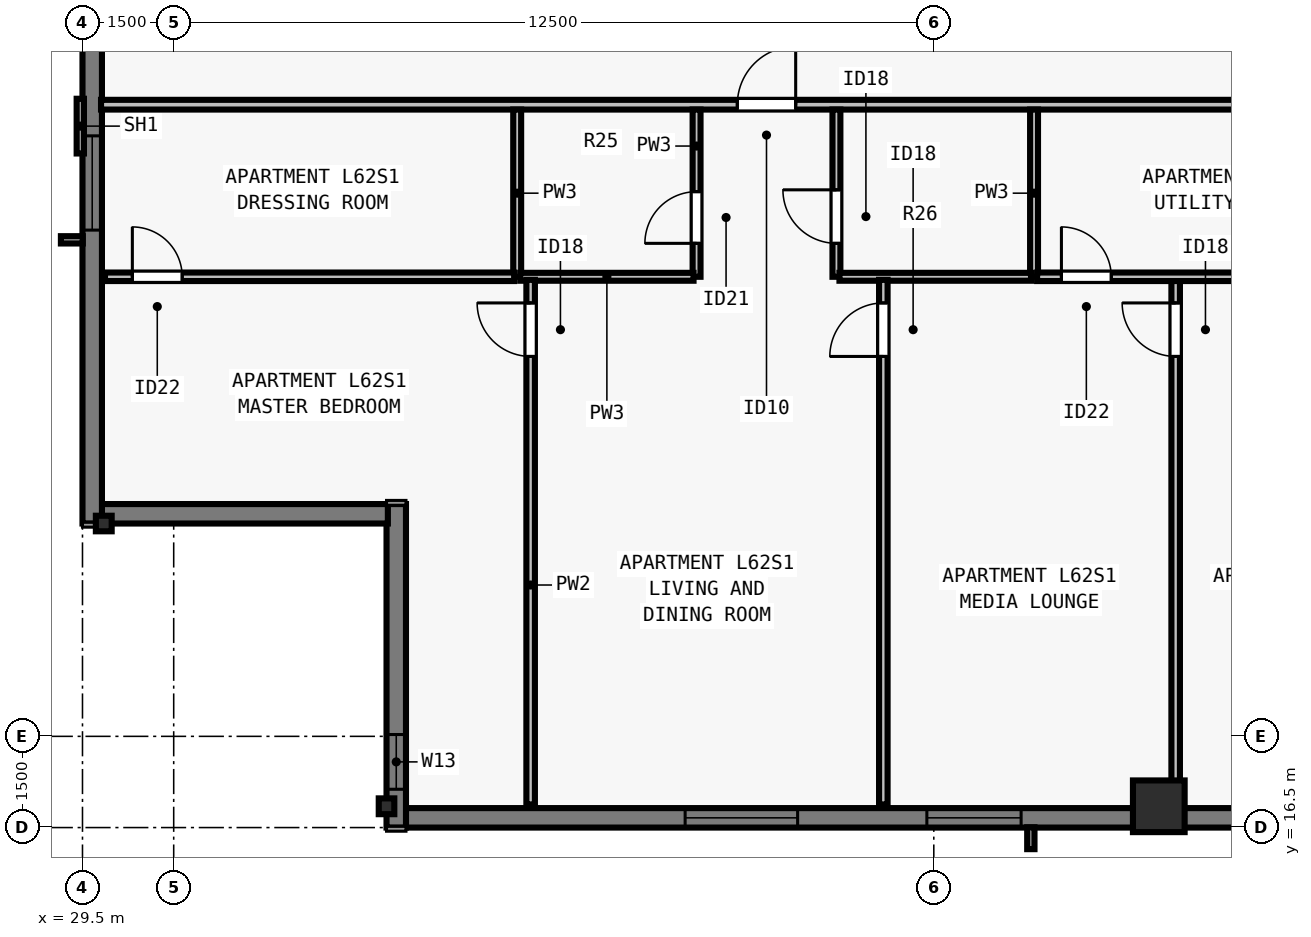
"""IFC4 building model, lengths in metres.
Left out: names, types, materials, properties, quantities, classifications, styles, units other than length and angle.
Written with IfcOpenShell. Run it as: python <this file> out.ifc"""

import sys

from ifc_helpers import new_model, si_unit, direction, frame, frame_2d, origin, origin_2d, place, context, subcontext, project, spatial, rectangle, i_section, extrude, element, fill, save


model = new_model("IFC4")
c1 = context("Model", 3, precision=1e-05, world=origin(), true_north=direction((0.0, 1.0)))
c2 = subcontext(c1, "Body", "Model", "MODEL_VIEW")
j1 = project(units=[si_unit("LENGTHUNIT", "METRE"), si_unit("PLANEANGLEUNIT", "RADIAN")], contexts=[c1])
p1 = place(None, origin())
s1 = spatial("IfcSite", under=j1, at=p1, CompositionType="ELEMENT")
p2 = place(p1, origin())
s2 = spatial("IfcBuilding", under=s1, at=p2, CompositionType="ELEMENT")
p3 = place(p2, frame((0.0, 0.0, 227.0)))
s3 = spatial("IfcBuildingStorey", under=s2, at=p3, CompositionType="ELEMENT", Elevation=227.0)
p4 = place(p3, frame((34.5, 16.85, 0.0), z_axis=(0.0, 0.0, 1.0), x_axis=(1.0, 0.0, 0.0)))
e1 = element("IfcColumn", 1, at=p4, inside=s3, PredefinedType="COLUMN", context=c2, shape_type="SweptSolid", body=[
    extrude(i_section(OverallWidth=0.256, OverallDepth=0.26, WebThickness=0.01, FlangeThickness=0.017, FilletRadius=0.013, at=origin_2d()), origin(), (0.0, 0.0, 1.0), 3.5),
])
p5 = place(p3, frame((47.2, 16.85, 0.0), z_axis=(0.0, 0.0, 1.0), x_axis=(1.0, 0.0, 0.0)))
e2 = element("IfcColumn", 2, at=p5, inside=s3, PredefinedType="COLUMN", context=c2, shape_type="SweptSolid", body=[
    extrude(rectangle(XDim=0.85, YDim=0.85, at=origin_2d()), origin(), (0.0, 0.0, 1.0), 3.5),
])
p6 = place(p3, frame((29.85, 21.5, 0.0), z_axis=(0.0, 0.0, 1.0), x_axis=(0.0, 1.0, 0.0)))
e3 = element("IfcColumn", 3, at=p6, inside=s3, PredefinedType="COLUMN", context=c2, shape_type="SweptSolid", body=[
    extrude(i_section(OverallWidth=0.256, OverallDepth=0.26, WebThickness=0.01, FlangeThickness=0.017, FilletRadius=0.013, at=origin_2d()), origin(), (0.0, 0.0, 1.0), 3.5),
])
p7 = place(p3, frame((69.5, 16.66, 0.0), z_axis=(0.0, 0.0, 1.0), x_axis=(-1.0, 0.0, 0.0)))
e4 = element("IfcWall", 4, at=p7, inside=s3, PredefinedType="SOLIDWALL", context=c2, shape_type="SweptSolid", body=[
    extrude(rectangle(XDim=34.702, YDim=0.32, at=frame_2d((17.351, 0.0))), origin(), (0.0, 0.0, 1.0), 3.29),
])
p8 = place(p7, frame((5.613, 0.0, 0.8)))
e5 = element("IfcOpeningElement", 5, at=p8, cuts=e4, PredefinedType="OPENING", context=c2, shape_type="SweptSolid", body=[
    extrude(rectangle(XDim=1.55, YDim=1.678, at=frame_2d((0.775, 0.839))), frame((0.0, 0.17, 0.0), z_axis=(0.0, -1.0, 0.0), x_axis=(1.0, 0.0, 0.0)), (0.0, 0.0, 1.0), 0.34),
])
p9 = place(p7, frame((7.988, 0.0, 0.8)))
e6 = element("IfcOpeningElement", 6, at=p9, cuts=e4, PredefinedType="OPENING", context=c2, shape_type="SweptSolid", body=[
    extrude(rectangle(XDim=1.85, YDim=1.678, at=frame_2d((0.925, 0.839))), frame((0.0, 0.17, 0.0), z_axis=(0.0, -1.0, 0.0), x_axis=(1.0, 0.0, 0.0)), (0.0, 0.0, 1.0), 0.34),
])
p10 = place(p7, frame((10.263, 0.0, 0.8)))
e7 = element("IfcOpeningElement", 7, at=p10, cuts=e4, PredefinedType="OPENING", context=c2, shape_type="SweptSolid", body=[
    extrude(rectangle(XDim=1.55, YDim=1.678, at=frame_2d((0.775, 0.839))), frame((0.0, 0.17, 0.0), z_axis=(0.0, -1.0, 0.0), x_axis=(1.0, 0.0, 0.0)), (0.0, 0.0, 1.0), 0.34),
])
p11 = place(p7, frame((14.738, 0.0, 0.8)))
e8 = element("IfcOpeningElement", 8, at=p11, cuts=e4, PredefinedType="OPENING", context=c2, shape_type="SweptSolid", body=[
    extrude(rectangle(XDim=1.85, YDim=1.678, at=frame_2d((0.925, 0.839))), frame((0.0, 0.17, 0.0), z_axis=(0.0, -1.0, 0.0), x_axis=(1.0, 0.0, 0.0)), (0.0, 0.0, 1.0), 0.34),
])
p12 = place(p7, frame((18.264, 0.0, 0.8)))
e9 = element("IfcOpeningElement", 9, at=p12, cuts=e4, PredefinedType="OPENING", context=c2, shape_type="SweptSolid", body=[
    extrude(rectangle(XDim=1.55, YDim=1.678, at=frame_2d((0.775, 0.839))), frame((0.0, 0.17, 0.0), z_axis=(0.0, -1.0, 0.0), x_axis=(1.0, 0.0, 0.0)), (0.0, 0.0, 1.0), 0.34),
])
p13 = place(p7, frame((24.564, 0.0, 0.8)))
e10 = element("IfcOpeningElement", 10, at=p13, cuts=e4, PredefinedType="OPENING", context=c2, shape_type="SweptSolid", body=[
    extrude(rectangle(XDim=1.55, YDim=1.678, at=frame_2d((0.775, 0.839))), frame((0.0, 0.17, 0.0), z_axis=(0.0, -1.0, 0.0), x_axis=(1.0, 0.0, 0.0)), (0.0, 0.0, 1.0), 0.34),
])
p14 = place(p7, frame((28.24, 0.0, 0.8)))
e11 = element("IfcOpeningElement", 11, at=p14, cuts=e4, PredefinedType="OPENING", context=c2, shape_type="SweptSolid", body=[
    extrude(rectangle(XDim=1.85, YDim=1.678, at=frame_2d((0.925, 0.839))), frame((0.0, 0.17, 0.0), z_axis=(0.0, -1.0, 0.0), x_axis=(1.0, 0.0, 0.0)), (0.0, 0.0, 1.0), 0.34),
])
p15 = place(p3, frame((34.66, 16.5, 0.0), z_axis=(0.0, 0.0, 1.0), x_axis=(0.0, 1.0, 0.0)))
e12 = element("IfcWall", 12, at=p15, inside=s3, PredefinedType="SOLIDWALL", context=c2, shape_type="SweptSolid", body=[
    extrude(rectangle(XDim=5.32, YDim=0.32, at=frame_2d((2.66, 0.0))), origin(), (0.0, 0.0, 1.0), 3.29),
])
p16 = place(p15, frame((0.63, 0.0, 0.8)))
e13 = element("IfcOpeningElement", 13, at=p16, cuts=e12, PredefinedType="OPENING", context=c2, shape_type="SweptSolid", body=[
    extrude(rectangle(XDim=0.9, YDim=1.678, at=frame_2d((0.45, 0.839))), frame((0.0, 0.17, 0.0), z_axis=(0.0, -1.0, 0.0), x_axis=(1.0, 0.0, 0.0)), (0.0, 0.0, 1.0), 0.34),
])
p17 = place(p3, frame((34.522, 21.66, 0.0), z_axis=(0.0, 0.0, 1.0), x_axis=(-1.0, 0.0, 0.0)))
e14 = element("IfcWall", 14, at=p17, inside=s3, PredefinedType="SOLIDWALL", context=c2, shape_type="SweptSolid", body=[
    extrude(rectangle(XDim=4.724, YDim=0.32, at=frame_2d((2.362, 0.0))), origin(), (0.0, 0.0, 1.0), 3.29),
])
p18 = place(p3, frame((29.66, 21.5, 0.0), z_axis=(0.0, 0.0, 1.0), x_axis=(0.0, 1.0, 0.0)))
e15 = element("IfcWall", 15, at=p18, inside=s3, PredefinedType="SOLIDWALL", context=c2, shape_type="SweptSolid", body=[
    extrude(rectangle(XDim=22.602, YDim=0.32, at=frame_2d((11.301, 0.0))), origin(), (0.0, 0.0, 1.0), 3.29),
])
p19 = place(p18, frame((4.825, 0.0, 0.8)))
e16 = element("IfcOpeningElement", 16, at=p19, cuts=e15, PredefinedType="OPENING", context=c2, shape_type="SweptSolid", body=[
    extrude(rectangle(XDim=1.55, YDim=1.678, at=frame_2d((0.775, 0.839))), frame((0.0, 0.17, 0.0), z_axis=(0.0, -1.0, 0.0), x_axis=(1.0, 0.0, 0.0)), (0.0, 0.0, 1.0), 0.34),
])
p20 = place(p18, frame((9.426, 0.0, 0.8)))
e17 = element("IfcOpeningElement", 17, at=p20, cuts=e15, PredefinedType="OPENING", context=c2, shape_type="SweptSolid", body=[
    extrude(rectangle(XDim=1.85, YDim=1.678, at=frame_2d((0.925, 0.839))), frame((0.0, 0.17, 0.0), z_axis=(0.0, -1.0, 0.0), x_axis=(1.0, 0.0, 0.0)), (0.0, 0.0, 1.0), 0.34),
])
p21 = place(p18, frame((15.177, 0.0, 0.8)))
e18 = element("IfcOpeningElement", 18, at=p21, cuts=e15, PredefinedType="OPENING", context=c2, shape_type="SweptSolid", body=[
    extrude(rectangle(XDim=1.85, YDim=1.678, at=frame_2d((0.925, 0.839))), frame((0.0, 0.17, 0.0), z_axis=(0.0, -1.0, 0.0), x_axis=(1.0, 0.0, 0.0)), (0.0, 0.0, 1.0), 0.34),
])
p22 = place(p18, frame((19.677, 0.0, 0.8)))
e19 = element("IfcOpeningElement", 19, at=p22, cuts=e15, PredefinedType="OPENING", context=c2, shape_type="SweptSolid", body=[
    extrude(rectangle(XDim=1.55, YDim=1.678, at=frame_2d((0.775, 0.839))), frame((0.0, 0.17, 0.0), z_axis=(0.0, -1.0, 0.0), x_axis=(1.0, 0.0, 0.0)), (0.0, 0.0, 1.0), 0.34),
])
p23 = place(p3, frame((29.805, 28.387, 0.0), z_axis=(0.0, 0.0, 1.0), x_axis=(1.0, 0.0, 0.0)))
e20 = element("IfcWall", 20, at=p23, inside=s3, PredefinedType="PARTITIONING", context=c2, shape_type="SweptSolid", body=[
    extrude(rectangle(XDim=44.39, YDim=0.16, at=frame_2d((22.195, 0.0))), origin(), (0.0, 0.0, 1.0), 2.958),
])
p24 = place(p23, frame((10.464, 0.0, 0.0)))
e21 = element("IfcOpeningElement", 21, at=p24, cuts=e20, PredefinedType="OPENING", context=c2, shape_type="SweptSolid", body=[
    extrude(rectangle(XDim=0.96, YDim=2.18, at=frame_2d((0.48, 1.09))), frame((0.0, 0.09, 0.0), z_axis=(0.0, -1.0, 0.0), x_axis=(1.0, 0.0, 0.0)), (0.0, 0.0, 1.0), 0.18),
])
p25 = place(p23, frame((32.544, 0.0, 0.0)))
e22 = element("IfcOpeningElement", 22, at=p25, cuts=e20, PredefinedType="OPENING", context=c2, shape_type="SweptSolid", body=[
    extrude(rectangle(XDim=0.96, YDim=2.18, at=frame_2d((0.48, 1.09))), frame((0.0, 0.09, 0.0), z_axis=(0.0, -1.0, 0.0), x_axis=(1.0, 0.0, 0.0)), (0.0, 0.0, 1.0), 0.18),
])
p26 = place(p3, frame((36.649, 25.558, 0.0), z_axis=(0.0, 0.0, 1.0), x_axis=(0.0, 1.0, 0.0)))
e23 = element("IfcWall", 23, at=p26, inside=s3, PredefinedType="PLUMBINGWALL", context=c2, shape_type="SweptSolid", body=[
    extrude(rectangle(XDim=2.75, YDim=0.13, at=frame_2d((1.375, 0.0))), origin(), (0.0, 0.0, 1.0), 3.29),
])
p27 = place(p3, frame((39.599, 25.558, 0.0), z_axis=(0.0, 0.0, 1.0), x_axis=(0.0, 1.0, 0.0)))
e24 = element("IfcWall", 24, at=p27, inside=s3, PredefinedType="PLUMBINGWALL", context=c2, shape_type="SweptSolid", body=[
    extrude(rectangle(XDim=2.75, YDim=0.13, at=frame_2d((1.375, 0.0))), origin(), (0.0, 0.0, 1.0), 3.29),
])
p28 = place(p27, frame((0.55, 0.0, 0.0)))
e25 = element("IfcOpeningElement", 25, at=p28, cuts=e24, PredefinedType="OPENING", context=c2, shape_type="SweptSolid", body=[
    extrude(rectangle(XDim=0.85, YDim=2.08, at=frame_2d((0.425, 1.04))), frame((0.0, 0.075, 0.0), z_axis=(0.0, -1.0, 0.0), x_axis=(1.0, 0.0, 0.0)), (0.0, 0.0, 1.0), 0.15),
])
p29 = place(p3, frame((36.699, 25.558, 0.0), z_axis=(0.0, 0.0, 1.0), x_axis=(1.0, 0.0, 0.0)))
e26 = element("IfcWall", 26, at=p29, inside=s3, PredefinedType="PLUMBINGWALL", context=c2, shape_type="SweptSolid", body=[
    extrude(rectangle(XDim=2.85, YDim=0.13, at=frame_2d((1.425, 0.0))), origin(), (0.0, 0.0, 1.0), 3.29),
])
p30 = place(p3, frame((45.149, 25.558, 0.0), z_axis=(0.0, 0.0, 1.0), x_axis=(0.0, 1.0, 0.0)))
e27 = element("IfcWall", 27, at=p30, inside=s3, PredefinedType="PLUMBINGWALL", context=c2, shape_type="SweptSolid", body=[
    extrude(rectangle(XDim=2.75, YDim=0.13, at=frame_2d((1.375, 0.0))), origin(), (0.0, 0.0, 1.0), 3.29),
])
p31 = place(p3, frame((41.899, 25.558, 0.0), z_axis=(0.0, 0.0, 1.0), x_axis=(0.0, 1.0, 0.0)))
e28 = element("IfcWall", 28, at=p31, inside=s3, PredefinedType="PLUMBINGWALL", context=c2, shape_type="SweptSolid", body=[
    extrude(rectangle(XDim=2.75, YDim=0.13, at=frame_2d((1.375, 0.0))), origin(), (0.0, 0.0, 1.0), 2.573),
])
p32 = place(p31, frame((0.55, 0.0, 0.0)))
e29 = element("IfcOpeningElement", 29, at=p32, cuts=e28, PredefinedType="OPENING", context=c2, shape_type="SweptSolid", body=[
    extrude(rectangle(XDim=0.88, YDim=2.1, at=frame_2d((0.44, 1.05))), frame((0.0, 0.075, 0.0), z_axis=(0.0, -1.0, 0.0), x_axis=(1.0, 0.0, 0.0)), (0.0, 0.0, 1.0), 0.15),
])
p33 = place(p3, frame((41.949, 25.558, 0.0), z_axis=(0.0, 0.0, 1.0), x_axis=(1.0, 0.0, 0.0)))
e30 = element("IfcWall", 30, at=p33, inside=s3, PredefinedType="PLUMBINGWALL", context=c2, shape_type="SweptSolid", body=[
    extrude(rectangle(XDim=3.15, YDim=0.13, at=frame_2d((1.575, 0.0))), origin(), (0.0, 0.0, 1.0), 3.29),
])
p34 = place(p3, frame((36.87, 16.88, 0.0), z_axis=(0.0, 0.0, 1.0), x_axis=(0.0, 1.0, 0.0)))
e31 = element("IfcWall", 31, at=p34, inside=s3, PredefinedType="PARTITIONING", context=c2, shape_type="SweptSolid", body=[
    extrude(rectangle(XDim=8.628, YDim=0.14, at=frame_2d((4.314, 0.0))), origin(), (0.0, 0.0, 1.0), 2.573),
])
p35 = place(p34, frame((7.367, 0.0, 0.0)))
e32 = element("IfcOpeningElement", 32, at=p35, cuts=e31, PredefinedType="OPENING", context=c2, shape_type="SweptSolid", body=[
    extrude(rectangle(XDim=0.88, YDim=2.1, at=frame_2d((0.44, 1.05))), frame((0.0, 0.08, 0.0), z_axis=(0.0, -1.0, 0.0), x_axis=(1.0, 0.0, 0.0)), (0.0, 0.0, 1.0), 0.16),
])
p36 = place(p3, frame((29.87, 25.558, 0.0), z_axis=(0.0, 0.0, 1.0), x_axis=(1.0, 0.0, 0.0)))
e33 = element("IfcWall", 33, at=p36, inside=s3, PredefinedType="PARTITIONING", context=c2, shape_type="SweptSolid", body=[
    extrude(rectangle(XDim=6.729, YDim=0.14, at=frame_2d((3.364, 0.0))), origin(), (0.0, 0.0, 1.0), 2.958),
])
p37 = place(p36, frame((0.45, 0.0, 0.0)))
e34 = element("IfcOpeningElement", 34, at=p37, cuts=e33, PredefinedType="OPENING", context=c2, shape_type="SweptSolid", body=[
    extrude(rectangle(XDim=0.82, YDim=2.1, at=frame_2d((0.41, 1.05))), frame((0.0, 0.08, 0.0), z_axis=(0.0, -1.0, 0.0), x_axis=(1.0, 0.0, 0.0)), (0.0, 0.0, 1.0), 0.16),
])
p38 = place(p3, frame((47.478, 16.88, 0.0), z_axis=(0.0, 0.0, 1.0), x_axis=(0.0, 1.0, 0.0)))
e35 = element("IfcWall", 35, at=p38, inside=s3, PredefinedType="PARTITIONING", context=c2, shape_type="SweptSolid", body=[
    extrude(rectangle(XDim=8.718, YDim=0.14, at=frame_2d((4.359, 0.0))), origin(), (0.0, 0.0, 1.0), 2.958),
])
p39 = place(p38, frame((7.367, 0.0, 0.0)))
e36 = element("IfcOpeningElement", 36, at=p39, cuts=e35, PredefinedType="OPENING", context=c2, shape_type="SweptSolid", body=[
    extrude(rectangle(XDim=0.88, YDim=2.1, at=frame_2d((0.44, 1.05))), frame((0.0, 0.08, 0.0), z_axis=(0.0, -1.0, 0.0), x_axis=(1.0, 0.0, 0.0)), (0.0, 0.0, 1.0), 0.16),
])
p40 = place(p3, frame((45.199, 25.558, 0.0), z_axis=(0.0, 0.0, 1.0), x_axis=(1.0, 0.0, 0.0)))
e37 = element("IfcWall", 37, at=p40, inside=s3, PredefinedType="PARTITIONING", context=c2, shape_type="SweptSolid", body=[
    extrude(rectangle(XDim=6.429, YDim=0.14, at=frame_2d((3.214, 0.0))), origin(), (0.0, 0.0, 1.0), 3.29),
])
p41 = place(p40, frame((0.4, 0.0, 0.0)))
e38 = element("IfcOpeningElement", 38, at=p41, cuts=e37, PredefinedType="OPENING", context=c2, shape_type="SweptSolid", body=[
    extrude(rectangle(XDim=0.82, YDim=2.1, at=frame_2d((0.41, 1.05))), frame((0.0, 0.08, 0.0), z_axis=(0.0, -1.0, 0.0), x_axis=(1.0, 0.0, 0.0)), (0.0, 0.0, 1.0), 0.16),
])
p42 = place(p3, frame((42.67, 16.88, 0.0), z_axis=(0.0, 0.0, 1.0), x_axis=(0.0, 1.0, 0.0)))
e39 = element("IfcWall", 39, at=p42, inside=s3, PredefinedType="PARTITIONING", context=c2, shape_type="SweptSolid", body=[
    extrude(rectangle(XDim=8.628, YDim=0.14, at=frame_2d((4.314, 0.0))), origin(), (0.0, 0.0, 1.0), 3.29),
])
p43 = place(p42, frame((7.367, 0.0, 0.0)))
e40 = element("IfcOpeningElement", 40, at=p43, cuts=e39, PredefinedType="OPENING", context=c2, shape_type="SweptSolid", body=[
    extrude(rectangle(XDim=0.88, YDim=2.1, at=frame_2d((0.44, 1.05))), frame((0.0, 0.08, 0.0), z_axis=(0.0, -1.0, 0.0), x_axis=(1.0, 0.0, 0.0)), (0.0, 0.0, 1.0), 0.16),
])
p44 = place(p13, origin())
e41 = element("IfcWindow", 41, at=p44, inside=s3, PartitioningType="SINGLE_PANEL", PredefinedType="WINDOW", context=c2, shape_type="SweptSolid", body=[
    extrude(rectangle(XDim=1.55, YDim=1.678, at=frame_2d((0.775, 0.839))), frame((0.0, -0.05, 0.0), z_axis=(0.0, -1.0, 0.0), x_axis=(1.0, 0.0, 0.0)), (0.0, 0.0, 1.0), 0.06),
])
fill(e10, e41)
p45 = place(p14, origin())
e42 = element("IfcWindow", 42, at=p45, inside=s3, PartitioningType="SINGLE_PANEL", PredefinedType="WINDOW", context=c2, shape_type="SweptSolid", body=[
    extrude(rectangle(XDim=1.85, YDim=1.678, at=frame_2d((0.925, 0.839))), frame((0.0, -0.05, 0.0), z_axis=(0.0, -1.0, 0.0), x_axis=(1.0, 0.0, 0.0)), (0.0, 0.0, 1.0), 0.06),
])
fill(e11, e42)
p46 = place(p19, origin())
e43 = element("IfcWindow", 43, at=p46, inside=s3, PartitioningType="SINGLE_PANEL", PredefinedType="WINDOW", context=c2, shape_type="SweptSolid", body=[
    extrude(rectangle(XDim=1.55, YDim=1.678, at=frame_2d((0.775, 0.839))), frame((0.0, -0.05, 0.0), z_axis=(0.0, -1.0, 0.0), x_axis=(1.0, 0.0, 0.0)), (0.0, 0.0, 1.0), 0.06),
])
fill(e16, e43)
p47 = place(p16, origin())
e44 = element("IfcWindow", 44, at=p47, inside=s3, PartitioningType="SINGLE_PANEL", PredefinedType="WINDOW", context=c2, shape_type="SweptSolid", body=[
    extrude(rectangle(XDim=0.9, YDim=1.678, at=frame_2d((0.45, 0.839))), frame((0.0, -0.04, 0.0), z_axis=(0.0, -1.0, 0.0), x_axis=(1.0, 0.0, 0.0)), (0.0, 0.0, 1.0), 0.06),
])
fill(e13, e44)
p48 = place(p28, origin())
e45 = element("IfcDoor", 45, at=p48, inside=s3, OperationType="SINGLE_SWING_LEFT", PredefinedType="DOOR", context=c2, shape_type="SweptSolid", body=[
    extrude(rectangle(XDim=0.85, YDim=2.08, at=frame_2d((0.425, 1.04))), frame((0.0, 0.025, 0.0), z_axis=(0.0, -1.0, 0.0), x_axis=(1.0, 0.0, 0.0)), (0.0, 0.0, 1.0), 0.05),
])
fill(e25, e45)
p49 = place(p32, origin())
e46 = element("IfcDoor", 46, at=p49, inside=s3, OperationType="SINGLE_SWING_RIGHT", PredefinedType="DOOR", context=c2, shape_type="SweptSolid", body=[
    extrude(rectangle(XDim=0.88, YDim=2.1, at=frame_2d((0.44, 1.05))), frame((0.0, 0.025, 0.0), z_axis=(0.0, -1.0, 0.0), x_axis=(1.0, 0.0, 0.0)), (0.0, 0.0, 1.0), 0.05),
])
fill(e29, e46)
p50 = place(p37, origin())
e47 = element("IfcDoor", 47, at=p50, inside=s3, OperationType="SINGLE_SWING_LEFT", PredefinedType="DOOR", context=c2, shape_type="SweptSolid", body=[
    extrude(rectangle(XDim=0.82, YDim=2.1, at=frame_2d((0.41, 1.05))), frame((0.0, 0.025, 0.0), z_axis=(0.0, -1.0, 0.0), x_axis=(1.0, 0.0, 0.0)), (0.0, 0.0, 1.0), 0.05),
])
fill(e34, e47)
p51 = place(p35, origin())
e48 = element("IfcDoor", 48, at=p51, inside=s3, OperationType="SINGLE_SWING_RIGHT", PredefinedType="DOOR", context=c2, shape_type="SweptSolid", body=[
    extrude(rectangle(XDim=0.88, YDim=2.1, at=frame_2d((0.44, 1.05))), frame((0.0, 0.025, 0.0), z_axis=(0.0, -1.0, 0.0), x_axis=(1.0, 0.0, 0.0)), (0.0, 0.0, 1.0), 0.05),
])
fill(e32, e48)
p52 = place(p41, origin())
e49 = element("IfcDoor", 49, at=p52, inside=s3, OperationType="SINGLE_SWING_LEFT", PredefinedType="DOOR", context=c2, shape_type="SweptSolid", body=[
    extrude(rectangle(XDim=0.82, YDim=2.1, at=frame_2d((0.41, 1.05))), frame((0.0, 0.025, 0.0), z_axis=(0.0, -1.0, 0.0), x_axis=(1.0, 0.0, 0.0)), (0.0, 0.0, 1.0), 0.05),
])
fill(e38, e49)
p53 = place(p39, origin())
e50 = element("IfcDoor", 50, at=p53, inside=s3, OperationType="SINGLE_SWING_RIGHT", PredefinedType="DOOR", context=c2, shape_type="SweptSolid", body=[
    extrude(rectangle(XDim=0.88, YDim=2.1, at=frame_2d((0.44, 1.05))), frame((0.0, 0.025, 0.0), z_axis=(0.0, -1.0, 0.0), x_axis=(1.0, 0.0, 0.0)), (0.0, 0.0, 1.0), 0.05),
])
fill(e36, e50)
p54 = place(p43, origin())
e51 = element("IfcDoor", 51, at=p54, inside=s3, OperationType="SINGLE_SWING_LEFT", PredefinedType="DOOR", context=c2, shape_type="SweptSolid", body=[
    extrude(rectangle(XDim=0.88, YDim=2.1, at=frame_2d((0.44, 1.05))), frame((0.0, 0.025, 0.0), z_axis=(0.0, -1.0, 0.0), x_axis=(1.0, 0.0, 0.0)), (0.0, 0.0, 1.0), 0.05),
])
fill(e40, e51)
p55 = place(p24, origin())
e52 = element("IfcDoor", 52, at=p55, inside=s3, OperationType="SINGLE_SWING_RIGHT", PredefinedType="DOOR", context=c2, shape_type="SweptSolid", body=[
    extrude(rectangle(XDim=0.96, YDim=2.18, at=frame_2d((0.48, 1.09))), frame((0.0, 0.025, 0.0), z_axis=(0.0, -1.0, 0.0), x_axis=(1.0, 0.0, 0.0)), (0.0, 0.0, 1.0), 0.05),
])
fill(e21, e52)
save(model, sys.argv[1])
